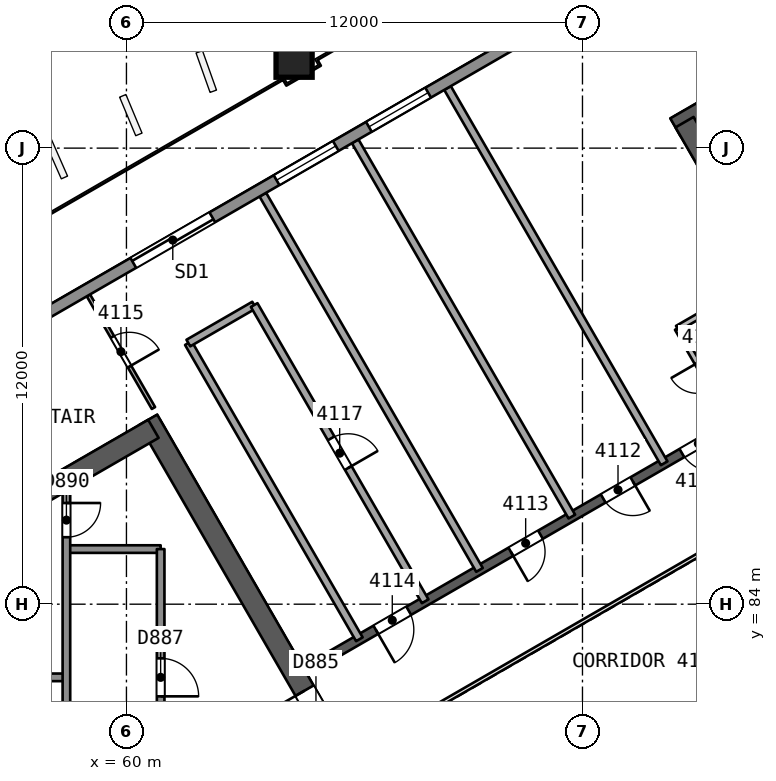
"""IFC4 building model, lengths in metres.
Left out: names, types, materials, properties, quantities, classifications, styles, units other than length and angle.
Written with IfcOpenShell. Run it as: python <this file> out.ifc"""

import sys

from ifc_helpers import new_model, si_unit, direction, frame, frame_2d, origin, origin_2d, place, context, subcontext, project, spatial, rectangle, extrude, element, fill, save


model = new_model("IFC4")
c1 = context("Model", 3, precision=1e-05, world=origin(), true_north=direction((0.0, 1.0)))
c2 = subcontext(c1, "Body", "Model", "MODEL_VIEW")
j1 = project(units=[si_unit("LENGTHUNIT", "METRE"), si_unit("PLANEANGLEUNIT", "RADIAN")], contexts=[c1])
p1 = place(None, origin())
s1 = spatial("IfcSite", under=j1, at=p1, CompositionType="ELEMENT")
p2 = place(p1, origin())
s2 = spatial("IfcBuilding", under=s1, at=p2, CompositionType="ELEMENT")
p3 = place(p2, frame((0.0, 0.0, 171.1)))
s3 = spatial("IfcBuildingStorey", under=s2, at=p3, CompositionType="ELEMENT", Elevation=171.1)
p4 = place(p3, frame((65.682, 80.0, 0.0), z_axis=(0.0, 0.0, 1.0), x_axis=(-0.500000202252, 0.866025287014, 0.0)))
e1 = element("IfcWall", 1, at=p4, inside=s3, PredefinedType="SHEAR", context=c2, shape_type="SweptSolid", body=[
    extrude(rectangle(XDim=10.221, YDim=0.55, at=frame_2d((5.111, 0.0))), origin(), (0.0, 0.0, 1.0), 3.7),
])
p5 = place(p4, frame((0.791, 0.0, 0.0)))
e2 = element("IfcOpeningElement", 2, at=p5, cuts=e1, PredefinedType="OPENING", context=c2, shape_type="SweptSolid", body=[
    extrude(rectangle(XDim=1.2, YDim=2.1, at=frame_2d((0.6, 1.05))), frame((0.0, 0.286, 0.0), z_axis=(0.0, -1.0, 0.0), x_axis=(1.0, 0.0, 0.0)), (0.0, 0.0, 1.0), 0.571),
])
p6 = place(p3, frame((60.709, 88.614, 0.0), z_axis=(0.0, 0.0, 1.0), x_axis=(-0.866020164116, -0.500009075263, 0.0)))
e3 = element("IfcWall", 3, at=p6, inside=s3, PredefinedType="SHEAR", context=c2, shape_type="SweptSolid", body=[
    extrude(rectangle(XDim=14.058, YDim=0.55, at=frame_2d((7.029, 0.0))), origin(), (0.0, 0.0, 1.0), 3.7),
])
p7 = place(p3, frame((86.723, 103.633, 0.0), z_axis=(0.0, 0.0, 1.0), x_axis=(-0.866023530946, -0.500003243837, 0.0)))
e4 = element("IfcWall", 4, at=p7, inside=s3, PredefinedType="SHEAR", context=c2, shape_type="SweptSolid", body=[
    extrude(rectangle(XDim=14.175, YDim=0.55, at=frame_2d((7.087, 0.0))), origin(), (0.0, 0.0, 1.0), 3.7),
])
p8 = place(p3, frame((74.686, 96.683, 0.0), z_axis=(0.0, 0.0, 1.0), x_axis=(0.499997818338, -0.866026663364, 0.0)))
e5 = element("IfcWall", 5, at=p8, inside=s3, PredefinedType="SHEAR", context=c2, shape_type="SweptSolid", body=[
    extrude(rectangle(XDim=10.105, YDim=0.55, at=frame_2d((5.052, 0.0))), origin(), (0.0, 0.0, 1.0), 3.7),
])
p9 = place(p8, frame((7.955, 0.0, 0.0)))
e6 = element("IfcOpeningElement", 6, at=p9, cuts=e5, PredefinedType="OPENING", context=c2, shape_type="SweptSolid", body=[
    extrude(rectangle(XDim=1.2, YDim=2.1, at=frame_2d((0.6, 1.05))), frame((0.0, 0.286, 0.0), z_axis=(0.0, -1.0, 0.0), x_axis=(1.0, 0.0, 0.0)), (0.0, 0.0, 1.0), 0.571),
])
p10 = place(p3, frame((78.2, 90.046, 0.0), z_axis=(0.0, 0.0, 1.0), x_axis=(-0.866026492143, -0.499998114903, 0.0)))
e7 = element("IfcWall", 7, at=p10, inside=s3, PredefinedType="SHEAR", context=c2, shape_type="SweptSolid", body=[
    extrude(rectangle(XDim=15.588, YDim=0.25, at=frame_2d((7.794, 0.0))), origin(), (0.0, 0.0, 1.0), 3.25),
])
p11 = place(p10, frame((3.138, 0.0, 0.0)))
e8 = element("IfcOpeningElement", 8, at=p11, cuts=e7, PredefinedType="OPENING", context=c2, shape_type="SweptSolid", body=[
    extrude(rectangle(XDim=1.0, YDim=2.1, at=frame_2d((0.5, 1.05))), frame((0.0, 0.135, 0.0), z_axis=(0.0, -1.0, 0.0), x_axis=(1.0, 0.0, 0.0)), (0.0, 0.0, 1.0), 0.271),
])
p12 = place(p10, frame((5.629, 0.0, 0.0)))
e9 = element("IfcOpeningElement", 9, at=p12, cuts=e7, PredefinedType="OPENING", context=c2, shape_type="SweptSolid", body=[
    extrude(rectangle(XDim=0.9, YDim=2.1, at=frame_2d((0.45, 1.05))), frame((0.0, 0.135, 0.0), z_axis=(0.0, -1.0, 0.0), x_axis=(1.0, 0.0, 0.0)), (0.0, 0.0, 1.0), 0.271),
])
p13 = place(p10, frame((8.435, 0.0, 0.0)))
e10 = element("IfcOpeningElement", 10, at=p13, cuts=e7, PredefinedType="OPENING", context=c2, shape_type="SweptSolid", body=[
    extrude(rectangle(XDim=0.9, YDim=2.1, at=frame_2d((0.45, 1.05))), frame((0.0, 0.135, 0.0), z_axis=(0.0, -1.0, 0.0), x_axis=(1.0, 0.0, 0.0)), (0.0, 0.0, 1.0), 0.271),
])
p14 = place(p10, frame((12.438, 0.0, 0.0)))
e11 = element("IfcOpeningElement", 11, at=p14, cuts=e7, PredefinedType="OPENING", context=c2, shape_type="SweptSolid", body=[
    extrude(rectangle(XDim=1.0, YDim=2.1, at=frame_2d((0.5, 1.05))), frame((0.0, 0.135, 0.0), z_axis=(0.0, -1.0, 0.0), x_axis=(1.0, 0.0, 0.0)), (0.0, 0.0, 1.0), 0.271),
])
p15 = place(p3, frame((64.399, 98.361, 0.0), z_axis=(0.010093620709, -0.017482414954, 0.999796221231), x_axis=(0.866020200589, 0.50000901209, 8.5616e-08)))
e12 = element("IfcColumn", 12, at=p15, inside=s3, PredefinedType="COLUMN", context=c2, shape_type="SweptSolid", body=[
    extrude(rectangle(XDim=0.95, YDim=0.95, at=origin_2d()), origin(), (0.0, 0.0, 1.0), 3.701),
])
p16 = place(p3, frame((75.948, 88.746, 0.0), z_axis=(0.0, 0.0, 1.0), x_axis=(-0.499987231761, 0.866032775405, 0.0)))
e13 = element("IfcWall", 13, at=p16, inside=s3, PredefinedType="PARTITIONING", context=c2, shape_type="SweptSolid", body=[
    extrude(rectangle(XDim=2.9, YDim=0.15, at=frame_2d((1.45, 0.0))), origin(), (0.0, 0.0, 1.0), 3.25),
])
p17 = place(p16, frame((1.05, 0.0, 0.0)))
e14 = element("IfcOpeningElement", 14, at=p17, cuts=e13, PredefinedType="OPENING", context=c2, shape_type="SweptSolid", body=[
    extrude(rectangle(XDim=0.8, YDim=2.1, at=frame_2d((0.4, 1.05))), frame((0.0, 0.085, 0.0), z_axis=(0.0, -1.0, 0.0), x_axis=(1.0, 0.0, 0.0)), (0.0, 0.0, 1.0), 0.171),
])
p18 = place(p3, frame((74.498, 91.257, 0.0), z_axis=(0.0, 0.0, 1.0), x_axis=(0.866038271014, 0.499977712642, 0.0)))
e15 = element("IfcWall", 15, at=p18, inside=s3, PredefinedType="PARTITIONING", context=c2, shape_type="SweptSolid", body=[
    extrude(rectangle(XDim=2.401, YDim=0.15, at=frame_2d((1.2, 0.0))), origin(), (0.0, 0.0, 1.0), 3.25),
])
for number, where, z_axis, x_axis in (
    (16, (68.449, 97.582, 0.0), (0.0, 0.0, 1.0), (0.5, -0.866, 0.0)),
    (17, (66.019, 96.179, 0.0), (0.0, 0.0, 1.0), (0.5, -0.866, 0.0)),
    (18, (63.589, 94.776, 0.0), (0.0, 0.0, 1.0), (0.5, -0.866, 0.0)),
):
    element("IfcWall", number, at=place(p3, frame(where, z_axis=z_axis, x_axis=x_axis)), inside=s3, PredefinedType="PARTITIONING", context=c2, shape_type="SweptSolid", body=[
        extrude(rectangle(XDim=11.402, YDim=0.2, at=frame_2d((5.701, 0.0))), origin(), (0.0, 0.0, 1.0), 3.25),
    ])
p19 = place(p3, frame((58.999, 92.126, 0.0), z_axis=(0.0, 0.0, 1.0), x_axis=(0.499981725576, -0.866035954271, 0.0)))
e19 = element("IfcWall", 19, at=p19, inside=s3, PredefinedType="PARTITIONING", context=c2, shape_type="SweptSolid", body=[
    extrude(rectangle(XDim=3.424, YDim=0.1, at=frame_2d((1.712, 0.0))), origin(), (0.0, 0.0, 1.0), 3.25),
])
p20 = place(p19, frame((1.262, 0.0, 0.0)))
e20 = element("IfcOpeningElement", 20, at=p20, cuts=e19, PredefinedType="OPENING", context=c2, shape_type="SweptSolid", body=[
    extrude(rectangle(XDim=0.9, YDim=2.1, at=frame_2d((0.45, 1.05))), frame((0.0, 0.061, 0.0), z_axis=(0.0, -1.0, 0.0), x_axis=(1.0, 0.0, 0.0)), (0.0, 0.0, 1.0), 0.121),
])
p21 = place(p3, frame((66.129, 83.077, 0.0), z_axis=(0.0, 0.0, 1.0), x_axis=(-0.5000018851, 0.866024315419, 0.0)))
e21 = element("IfcWall", 21, at=p21, inside=s3, PredefinedType="PARTITIONING", context=c2, shape_type="SweptSolid", body=[
    extrude(rectangle(XDim=9.0, YDim=0.2, at=frame_2d((4.5, 0.0))), origin(), (0.0, 0.0, 1.0), 3.25),
])
p22 = place(p3, frame((61.629, 90.871, 0.0), z_axis=(0.0, 0.0, 1.0), x_axis=(0.866041268327, 0.499972520799, 0.0)))
e22 = element("IfcWall", 22, at=p22, inside=s3, PredefinedType="PARTITIONING", context=c2, shape_type="SweptSolid", body=[
    extrude(rectangle(XDim=2.0, YDim=0.2, at=frame_2d((1.0, 0.0))), origin(), (0.0, 0.0, 1.0), 3.25),
])
p23 = place(p3, frame((63.361, 91.871, 0.0), z_axis=(0.0, 0.0, 1.0), x_axis=(0.5000018851, -0.866024315419, 0.0)))
e23 = element("IfcWall", 23, at=p23, inside=s3, PredefinedType="PARTITIONING", context=c2, shape_type="SweptSolid", body=[
    extrude(rectangle(XDim=9.0, YDim=0.2, at=frame_2d((4.5, 0.0))), origin(), (0.0, 0.0, 1.0), 3.25),
])
p24 = place(p23, frame((4.05, 0.0, 0.0)))
e24 = element("IfcOpeningElement", 24, at=p24, cuts=e23, PredefinedType="OPENING", context=c2, shape_type="SweptSolid", body=[
    extrude(rectangle(XDim=0.9, YDim=2.1, at=frame_2d((0.45, 1.05))), frame((0.0, 0.11, 0.0), z_axis=(0.0, -1.0, 0.0), x_axis=(1.0, 0.0, 0.0)), (0.0, 0.0, 1.0), 0.221),
])
p25 = place(p3, frame((42.45, 82.744, 0.0), z_axis=(0.0, 0.0, 1.0), x_axis=(0.866024128163, 0.500002209434, 0.0)))
e25 = element("IfcWall", 25, at=p25, inside=s3, PredefinedType="SOLIDWALL", context=c2, shape_type="SweptSolid", body=[
    extrude(rectangle(XDim=53.635, YDim=0.3, at=frame_2d((26.817, 0.0))), origin(), (0.0, 0.0, 1.0), 3.25),
])
p26 = place(p25, frame((20.473, 0.0, 0.0)))
e26 = element("IfcOpeningElement", 26, at=p26, cuts=e25, PredefinedType="OPENING", context=c2, shape_type="SweptSolid", body=[
    extrude(rectangle(XDim=2.4, YDim=2.4, at=frame_2d((1.2, 1.2))), frame((0.0, 0.161, 0.0), z_axis=(0.0, -1.0, 0.0), x_axis=(1.0, 0.0, 0.0)), (0.0, 0.0, 1.0), 0.321),
])
p27 = place(p25, frame((9.514, 0.0, 0.0)))
e27 = element("IfcOpeningElement", 27, at=p27, cuts=e25, PredefinedType="OPENING", context=c2, shape_type="SweptSolid", body=[
    extrude(rectangle(XDim=2.4, YDim=2.4, at=frame_2d((1.2, 1.2))), frame((0.0, 0.161, 0.0), z_axis=(0.0, -1.0, 0.0), x_axis=(1.0, 0.0, 0.0)), (0.0, 0.0, 1.0), 0.321),
])
p28 = place(p25, frame((40.628, 0.0, 0.0)))
e28 = element("IfcOpeningElement", 28, at=p28, cuts=e25, PredefinedType="OPENING", context=c2, shape_type="SweptSolid", body=[
    extrude(rectangle(XDim=2.4, YDim=2.4, at=frame_2d((1.2, 1.2))), frame((0.0, 0.161, 0.0), z_axis=(0.0, -1.0, 0.0), x_axis=(1.0, 0.0, 0.0)), (0.0, 0.0, 1.0), 0.321),
])
p29 = place(p25, frame((27.632, 0.0, 0.9)))
e29 = element("IfcOpeningElement", 29, at=p29, cuts=e25, PredefinedType="OPENING", context=c2, shape_type="SweptSolid", body=[
    extrude(rectangle(XDim=1.8, YDim=1.5, at=frame_2d((0.9, 0.75))), frame((0.0, 0.161, 0.0), z_axis=(0.0, -1.0, 0.0), x_axis=(1.0, 0.0, 0.0)), (0.0, 0.0, 1.0), 0.321),
])
p30 = place(p25, frame((24.826, 0.0, 0.9)))
e30 = element("IfcOpeningElement", 30, at=p30, cuts=e25, PredefinedType="OPENING", context=c2, shape_type="SweptSolid", body=[
    extrude(rectangle(XDim=1.8, YDim=1.5, at=frame_2d((0.9, 0.75))), frame((0.0, 0.161, 0.0), z_axis=(0.0, -1.0, 0.0), x_axis=(1.0, 0.0, 0.0)), (0.0, 0.0, 1.0), 0.321),
])
p31 = place(p3, frame((60.9, 85.45, 0.0), z_axis=(0.0, 0.0, 1.0), x_axis=(-1.0, 0.0, 0.0)))
e31 = element("IfcWall", 31, at=p31, inside=s3, PredefinedType="SOLIDWALL", context=c2, shape_type="SweptSolid", body=[
    extrude(rectangle(XDim=2.48, YDim=0.2, at=frame_2d((1.24, 0.0))), origin(), (0.0, 0.0, 1.0), 3.25),
])
p32 = place(p3, frame((58.42, 82.075, 0.0), z_axis=(0.0, 0.0, 1.0), x_axis=(-1.0, 0.0, 0.0)))
e32 = element("IfcWall", 32, at=p32, inside=s3, PredefinedType="SOLIDWALL", context=c2, shape_type="SweptSolid", body=[
    extrude(rectangle(XDim=7.7, YDim=0.2, at=frame_2d((3.85, 0.0))), origin(), (0.0, 0.0, 1.0), 3.25),
])
p33 = place(p3, frame((60.9, 85.45, 0.0), z_axis=(0.0, 0.0, 1.0), x_axis=(0.0, -1.0, 0.0)))
e33 = element("IfcWall", 33, at=p33, inside=s3, PredefinedType="SOLIDWALL", context=c2, shape_type="SweptSolid", body=[
    extrude(rectangle(XDim=10.9, YDim=0.2, at=frame_2d((5.45, 0.0))), origin(), (0.0, 0.0, 1.0), 3.25),
])
p34 = place(p33, frame((2.875, 0.0, 0.0)))
e34 = element("IfcOpeningElement", 34, at=p34, cuts=e33, PredefinedType="OPENING", context=c2, shape_type="SweptSolid", body=[
    extrude(rectangle(XDim=1.0, YDim=2.1, at=frame_2d((0.5, 1.05))), frame((0.0, 0.11, 0.0), z_axis=(0.0, -1.0, 0.0), x_axis=(1.0, 0.0, 0.0)), (0.0, 0.0, 1.0), 0.221),
])
p35 = place(p33, frame((7.375, 0.0, 0.0)))
e35 = element("IfcOpeningElement", 35, at=p35, cuts=e33, PredefinedType="OPENING", context=c2, shape_type="SweptSolid", body=[
    extrude(rectangle(XDim=1.0, YDim=2.1, at=frame_2d((0.5, 1.05))), frame((0.0, 0.11, 0.0), z_axis=(0.0, -1.0, 0.0), x_axis=(1.0, 0.0, 0.0)), (0.0, 0.0, 1.0), 0.221),
])
p36 = place(p3, frame((58.42, 86.974, 0.0), z_axis=(0.0, 0.0, 1.0), x_axis=(0.0, -1.0, 0.0)))
e36 = element("IfcWall", 36, at=p36, inside=s3, PredefinedType="SOLIDWALL", context=c2, shape_type="SweptSolid", body=[
    extrude(rectangle(XDim=10.524, YDim=0.2, at=frame_2d((5.262, 0.0))), origin(), (0.0, 0.0, 1.0), 3.25),
])
p37 = place(p36, frame((0.312, 0.0, 0.0)))
e37 = element("IfcOpeningElement", 37, at=p37, cuts=e36, PredefinedType="OPENING", context=c2, shape_type="SweptSolid", body=[
    extrude(rectangle(XDim=0.9, YDim=2.1, at=frame_2d((0.45, 1.05))), frame((0.0, 0.11, 0.0), z_axis=(0.0, -1.0, 0.0), x_axis=(1.0, 0.0, 0.0)), (0.0, 0.0, 1.0), 0.221),
])
p38 = place(p3, frame((77.738, 86.846, 0.0), z_axis=(0.0, 0.0, 1.0), x_axis=(-0.866026658274, -0.499997827154, 0.0)))
e38 = element("IfcWall", 38, at=p38, inside=s3, PredefinedType="PARTITIONING", context=c2, shape_type="SweptSolid", body=[
    extrude(rectangle(XDim=11.588, YDim=0.1, at=frame_2d((5.794, 0.0))), origin(), (0.0, 0.0, 1.0), 3.25),
])
p39 = place(p11, origin())
e39 = element("IfcDoor", 39, at=p39, inside=s3, OperationType="SINGLE_SWING_LEFT", PredefinedType="NOTDEFINED", context=c2, shape_type="SweptSolid", body=[
    extrude(rectangle(XDim=1.0, YDim=2.1, at=frame_2d((0.5, 1.05))), frame((0.0, 0.025, 0.0), z_axis=(0.0, -1.0, 0.0), x_axis=(1.0, 0.0, 0.0)), (0.0, 0.0, 1.0), 0.05),
])
fill(e8, e39)
p40 = place(p12, origin())
e40 = element("IfcDoor", 40, at=p40, inside=s3, OperationType="SINGLE_SWING_LEFT", PredefinedType="NOTDEFINED", context=c2, shape_type="SweptSolid", body=[
    extrude(rectangle(XDim=0.9, YDim=2.1, at=frame_2d((0.45, 1.05))), frame((0.0, 0.025, 0.0), z_axis=(0.0, -1.0, 0.0), x_axis=(1.0, 0.0, 0.0)), (0.0, 0.0, 1.0), 0.05),
])
fill(e9, e40)
p41 = place(p13, origin())
e41 = element("IfcDoor", 41, at=p41, inside=s3, OperationType="SINGLE_SWING_RIGHT", PredefinedType="NOTDEFINED", context=c2, shape_type="SweptSolid", body=[
    extrude(rectangle(XDim=0.9, YDim=2.1, at=frame_2d((0.45, 1.05))), frame((0.0, 0.025, 0.0), z_axis=(0.0, -1.0, 0.0), x_axis=(1.0, 0.0, 0.0)), (0.0, 0.0, 1.0), 0.05),
])
fill(e10, e41)
p42 = place(p14, origin())
e42 = element("IfcDoor", 42, at=p42, inside=s3, OperationType="SINGLE_SWING_RIGHT", PredefinedType="NOTDEFINED", context=c2, shape_type="SweptSolid", body=[
    extrude(rectangle(XDim=1.0, YDim=2.1, at=frame_2d((0.5, 1.05))), frame((0.0, 0.025, 0.0), z_axis=(0.0, -1.0, 0.0), x_axis=(1.0, 0.0, 0.0)), (0.0, 0.0, 1.0), 0.05),
])
fill(e11, e42)
p43 = place(p20, origin())
e43 = element("IfcDoor", 43, at=p43, inside=s3, OperationType="SINGLE_SWING_RIGHT", PredefinedType="NOTDEFINED", context=c2, shape_type="SweptSolid", body=[
    extrude(rectangle(XDim=0.9, YDim=2.1, at=frame_2d((0.45, 1.05))), frame((0.0, 0.025, 0.0), z_axis=(0.0, -1.0, 0.0), x_axis=(1.0, 0.0, 0.0)), (0.0, 0.0, 1.0), 0.05),
])
fill(e20, e43)
p44 = place(p24, origin())
e44 = element("IfcDoor", 44, at=p44, inside=s3, OperationType="SINGLE_SWING_RIGHT", PredefinedType="NOTDEFINED", context=c2, shape_type="SweptSolid", body=[
    extrude(rectangle(XDim=0.9, YDim=2.1, at=frame_2d((0.45, 1.05))), frame((0.0, 0.025, 0.0), z_axis=(0.0, -1.0, 0.0), x_axis=(1.0, 0.0, 0.0)), (0.0, 0.0, 1.0), 0.05),
])
fill(e24, e44)
p45 = place(p26, origin())
e45 = element("IfcDoor", 45, at=p45, inside=s3, OperationType="SLIDING_TO_LEFT", PredefinedType="NOTDEFINED", context=c2, shape_type="SweptSolid", body=[
    extrude(rectangle(XDim=2.4, YDim=2.4, at=frame_2d((1.2, 1.2))), frame((0.0, 0.025, 0.0), z_axis=(0.0, -1.0, 0.0), x_axis=(1.0, 0.0, 0.0)), (0.0, 0.0, 1.0), 0.05),
])
fill(e26, e45)
p46 = place(p29, origin())
e46 = element("IfcWindow", 46, at=p46, inside=s3, PartitioningType="SINGLE_PANEL", PredefinedType="WINDOW", context=c2, shape_type="SweptSolid", body=[
    extrude(rectangle(XDim=1.8, YDim=1.5, at=frame_2d((0.9, 0.75))), frame((0.0, 0.03, 0.0), z_axis=(0.0, -1.0, 0.0), x_axis=(1.0, 0.0, 0.0)), (0.0, 0.0, 1.0), 0.06),
])
fill(e29, e46)
p47 = place(p30, origin())
e47 = element("IfcWindow", 47, at=p47, inside=s3, PartitioningType="SINGLE_PANEL", PredefinedType="WINDOW", context=c2, shape_type="SweptSolid", body=[
    extrude(rectangle(XDim=1.8, YDim=1.5, at=frame_2d((0.9, 0.75))), frame((0.0, 0.03, 0.0), z_axis=(0.0, -1.0, 0.0), x_axis=(1.0, 0.0, 0.0)), (0.0, 0.0, 1.0), 0.06),
])
fill(e30, e47)
p48 = place(p5, origin())
e48 = element("IfcDoor", 48, at=p48, inside=s3, OperationType="SINGLE_SWING_RIGHT", PredefinedType="NOTDEFINED", context=c2, shape_type="SweptSolid", body=[
    extrude(rectangle(XDim=1.2, YDim=2.1, at=frame_2d((0.6, 1.05))), frame((0.0, 0.025, 0.0), z_axis=(0.0, -1.0, 0.0), x_axis=(1.0, 0.0, 0.0)), (0.0, 0.0, 1.0), 0.05),
])
fill(e2, e48)
p49 = place(p34, origin())
e49 = element("IfcDoor", 49, at=p49, inside=s3, OperationType="SINGLE_SWING_RIGHT", PredefinedType="NOTDEFINED", context=c2, shape_type="SweptSolid", body=[
    extrude(rectangle(XDim=1.0, YDim=2.1, at=frame_2d((0.5, 1.05))), frame((0.0, 0.025, 0.0), z_axis=(0.0, -1.0, 0.0), x_axis=(1.0, 0.0, 0.0)), (0.0, 0.0, 1.0), 0.05),
])
fill(e34, e49)
p50 = place(p37, origin())
e50 = element("IfcDoor", 50, at=p50, inside=s3, OperationType="SINGLE_SWING_LEFT", PredefinedType="NOTDEFINED", context=c2, shape_type="SweptSolid", body=[
    extrude(rectangle(XDim=0.9, YDim=2.1, at=frame_2d((0.45, 1.05))), frame((0.0, 0.025, 0.0), z_axis=(0.0, -1.0, 0.0), x_axis=(1.0, 0.0, 0.0)), (0.0, 0.0, 1.0), 0.05),
])
fill(e37, e50)
save(model, sys.argv[1])
